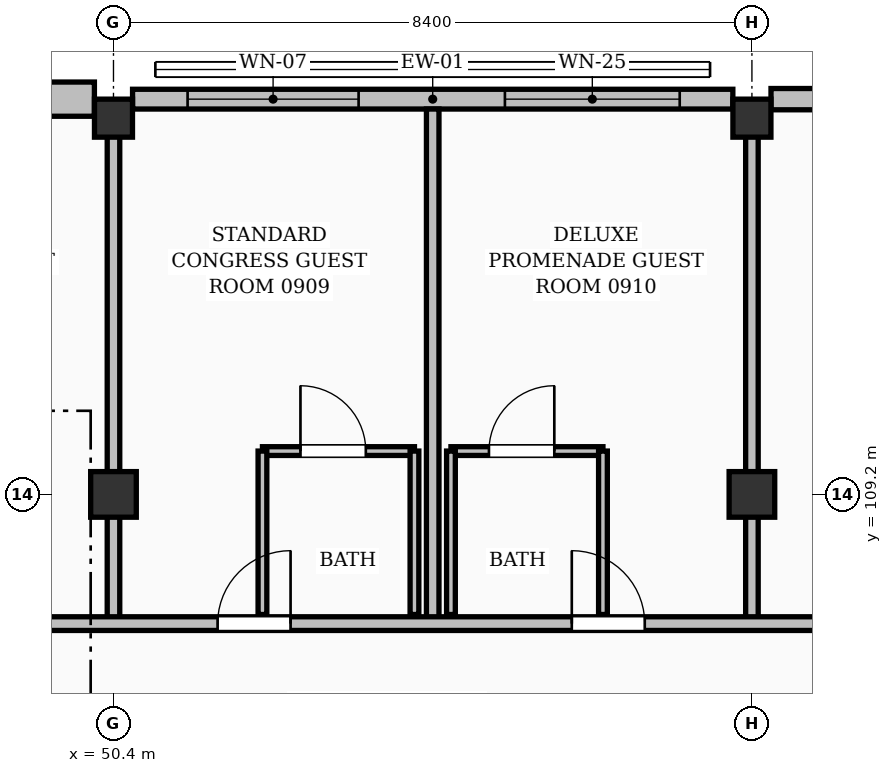
"""IFC4 building model, lengths in metres.
Left out: names, types, materials, properties, quantities, classifications, styles, units other than length and angle.
Written with IfcOpenShell. Run it as: python <this file> out.ifc"""

import sys

from ifc_helpers import new_model, si_unit, direction, frame, frame_2d, origin, origin_2d, place, context, subcontext, project, spatial, rectangle, extrude, element, fill, save


model = new_model("IFC4")
c1 = context("Model", 3, precision=1e-05, world=origin(), true_north=direction((0.0, 1.0)))
c2 = subcontext(c1, "Body", "Model", "MODEL_VIEW")
j1 = project(units=[si_unit("LENGTHUNIT", "METRE"), si_unit("PLANEANGLEUNIT", "RADIAN")], contexts=[c1])
p1 = place(None, origin())
s1 = spatial("IfcSite", under=j1, at=p1, CompositionType="ELEMENT")
p2 = place(p1, origin())
s2 = spatial("IfcBuilding", under=s1, at=p2, CompositionType="ELEMENT")
p3 = place(p2, frame((0.0, 0.0, 31.92)))
s3 = spatial("IfcBuildingStorey", under=s2, at=p3, CompositionType="ELEMENT", Elevation=31.92)
p4 = place(p3, frame((50.4, 109.2, 0.0), z_axis=(0.0, 0.0, 1.0), x_axis=(1.0, 0.0, 0.0)))
e1 = element("IfcColumn", 1, at=p4, inside=s3, PredefinedType="COLUMN", context=c2, shape_type="SweptSolid", body=[
    extrude(rectangle(XDim=0.6, YDim=0.6, at=origin_2d()), origin(), (0.0, 0.0, 1.0), 3.36),
])
p5 = place(p3, frame((50.4, 114.15, 0.0), z_axis=(0.0, 0.0, 1.0), x_axis=(1.0, 0.0, 0.0)))
e2 = element("IfcColumn", 2, at=p5, inside=s3, PredefinedType="COLUMN", context=c2, shape_type="SweptSolid", body=[
    extrude(rectangle(XDim=0.5, YDim=0.5, at=origin_2d()), origin(), (0.0, 0.0, 1.0), 3.36),
])
p6 = place(p3, frame((58.8, 109.2, 0.0), z_axis=(0.0, 0.0, 1.0), x_axis=(1.0, 0.0, 0.0)))
e3 = element("IfcColumn", 3, at=p6, inside=s3, PredefinedType="COLUMN", context=c2, shape_type="SweptSolid", body=[
    extrude(rectangle(XDim=0.6, YDim=0.6, at=origin_2d()), origin(), (0.0, 0.0, 1.0), 3.36),
])
p7 = place(p3, frame((58.8, 114.15, 0.0), z_axis=(0.0, 0.0, 1.0), x_axis=(1.0, 0.0, 0.0)))
e4 = element("IfcColumn", 4, at=p7, inside=s3, PredefinedType="COLUMN", context=c2, shape_type="SweptSolid", body=[
    extrude(rectangle(XDim=0.5, YDim=0.5, at=origin_2d()), origin(), (0.0, 0.0, 1.0), 3.36),
])
p8 = place(p3, frame((42.251, 114.4, 0.0), z_axis=(0.0, 0.0, 1.0), x_axis=(1.0, 0.0, 0.0)))
e5 = element("IfcWall", 5, at=p8, inside=s3, PredefinedType="SOLIDWALL", context=c2, shape_type="SweptSolid", body=[
    extrude(rectangle(XDim=7.898, YDim=0.45, at=frame_2d((3.949, 0.0))), origin(), (0.0, 0.0, 1.0), 2.474),
])
p9 = place(p8, frame((1.124, 0.0, 0.0)))
e6 = element("IfcOpeningElement", 6, at=p9, cuts=e5, PredefinedType="OPENING", context=c2, shape_type="SweptSolid", body=[
    extrude(rectangle(XDim=1.55, YDim=2.08, at=frame_2d((0.775, 1.04))), frame((0.0, 0.235, 0.0), z_axis=(0.0, -1.0, 0.0), x_axis=(1.0, 0.0, 0.0)), (0.0, 0.0, 1.0), 0.47),
])
p10 = place(p8, frame((4.724, 0.0, 0.25)))
e7 = element("IfcOpeningElement", 7, at=p10, cuts=e5, PredefinedType="OPENING", context=c2, shape_type="SweptSolid", body=[
    extrude(rectangle(XDim=2.35, YDim=1.85, at=frame_2d((1.175, 0.925))), frame((0.0, 0.235, 0.0), z_axis=(0.0, -1.0, 0.0), x_axis=(1.0, 0.0, 0.0)), (0.0, 0.0, 1.0), 0.47),
])
p11 = place(p3, frame((50.651, 114.4, 0.0), z_axis=(0.0, 0.0, 1.0), x_axis=(1.0, 0.0, 0.0)))
e8 = element("IfcWall", 8, at=p11, inside=s3, PredefinedType="SOLIDWALL", context=c2, shape_type="SweptSolid", body=[
    extrude(rectangle(XDim=7.898, YDim=0.26, at=frame_2d((3.949, 0.0))), origin(), (0.0, 0.0, 1.0), 2.414),
])
p12 = place(p11, frame((0.724, 0.0, 0.25)))
e9 = element("IfcOpeningElement", 9, at=p12, cuts=e8, PredefinedType="OPENING", context=c2, shape_type="SweptSolid", body=[
    extrude(rectangle(XDim=2.25, YDim=1.95, at=frame_2d((1.125, 0.975))), frame((0.0, 0.14, 0.0), z_axis=(0.0, -1.0, 0.0), x_axis=(1.0, 0.0, 0.0)), (0.0, 0.0, 1.0), 0.28),
])
p13 = place(p11, frame((4.899, 0.0, 0.25)))
e10 = element("IfcOpeningElement", 10, at=p13, cuts=e8, PredefinedType="OPENING", context=c2, shape_type="SweptSolid", body=[
    extrude(rectangle(XDim=2.3, YDim=1.75, at=frame_2d((1.15, 0.875))), frame((0.0, 0.14, 0.0), z_axis=(0.0, -1.0, 0.0), x_axis=(1.0, 0.0, 0.0)), (0.0, 0.0, 1.0), 0.28),
])
p14 = place(p3, frame((59.051, 114.4, 0.0), z_axis=(0.0, 0.0, 1.0), x_axis=(1.0, 0.0, 0.0)))
e11 = element("IfcWall", 11, at=p14, inside=s3, PredefinedType="SOLIDWALL", context=c2, shape_type="SweptSolid", body=[
    extrude(rectangle(XDim=7.898, YDim=0.28, at=frame_2d((3.949, 0.0))), origin(), (0.0, 0.0, 1.0), 2.414),
])
p15 = place(p14, frame((1.074, 0.0, 0.0)))
e12 = element("IfcOpeningElement", 12, at=p15, cuts=e11, PredefinedType="OPENING", context=c2, shape_type="SweptSolid", body=[
    extrude(rectangle(XDim=1.65, YDim=2.08, at=frame_2d((0.825, 1.04))), frame((0.0, 0.15, 0.0), z_axis=(0.0, -1.0, 0.0), x_axis=(1.0, 0.0, 0.0)), (0.0, 0.0, 1.0), 0.3),
])
p16 = place(p14, frame((4.749, 0.0, 0.25)))
e13 = element("IfcOpeningElement", 13, at=p16, cuts=e11, PredefinedType="OPENING", context=c2, shape_type="SweptSolid", body=[
    extrude(rectangle(XDim=2.3, YDim=1.75, at=frame_2d((1.15, 0.875))), frame((0.0, 0.15, 0.0), z_axis=(0.0, -1.0, 0.0), x_axis=(1.0, 0.0, 0.0)), (0.0, 0.0, 1.0), 0.3),
])
p17 = place(p3, frame((52.36, 109.77, 0.0), z_axis=(0.0, 0.0, 1.0), x_axis=(1.0, 0.0, 0.0)))
e14 = element("IfcWall", 14, at=p17, inside=s3, PredefinedType="PARTITIONING", context=c2, shape_type="SweptSolid", body=[
    extrude(rectangle(XDim=2.0, YDim=0.115, at=frame_2d((1.0, 0.0))), origin(), (0.0, 0.0, 1.0), 3.1),
])
p18 = place(p17, frame((0.5, 0.0, 0.0)))
e15 = element("IfcOpeningElement", 15, at=p18, cuts=e14, PredefinedType="OPENING", context=c2, shape_type="SweptSolid", body=[
    extrude(rectangle(XDim=0.86, YDim=2.05, at=frame_2d((0.43, 1.025))), frame((0.0, 0.067, 0.0), z_axis=(0.0, -1.0, 0.0), x_axis=(1.0, 0.0, 0.0)), (0.0, 0.0, 1.0), 0.135),
])
for number, where, z_axis, x_axis in (
    (16, (52.36, 107.62, 0.0), (0.0, 0.0, 1.0), (0.0, 1.0, 0.0)),
    (17, (54.36, 107.62, 0.0), (0.0, 0.0, 1.0), (0.0, 1.0, 0.0)),
):
    element("IfcWall", number, at=place(p3, frame(where, z_axis=z_axis, x_axis=x_axis)), inside=s3, PredefinedType="PARTITIONING", context=c2, shape_type="SweptSolid", body=[
        extrude(rectangle(XDim=2.15, YDim=0.115, at=frame_2d((1.075, 0.0))), origin(), (0.0, 0.0, 1.0), 3.1),
    ])
p19 = place(p3, frame((54.84, 109.77, 0.0), z_axis=(0.0, 0.0, 1.0), x_axis=(1.0, 0.0, 0.0)))
e18 = element("IfcWall", 18, at=p19, inside=s3, PredefinedType="PARTITIONING", context=c2, shape_type="SweptSolid", body=[
    extrude(rectangle(XDim=2.0, YDim=0.115, at=frame_2d((1.0, 0.0))), origin(), (0.0, 0.0, 1.0), 3.1),
])
p20 = place(p19, frame((0.5, 0.0, 0.0)))
e19 = element("IfcOpeningElement", 19, at=p20, cuts=e18, PredefinedType="OPENING", context=c2, shape_type="SweptSolid", body=[
    extrude(rectangle(XDim=0.86, YDim=2.05, at=frame_2d((0.43, 1.025))), frame((0.0, 0.067, 0.0), z_axis=(0.0, -1.0, 0.0), x_axis=(1.0, 0.0, 0.0)), (0.0, 0.0, 1.0), 0.135),
])
for number, where, z_axis, x_axis in (
    (20, (54.84, 107.62, 0.0), (0.0, 0.0, 1.0), (0.0, 1.0, 0.0)),
    (21, (56.84, 107.62, 0.0), (0.0, 0.0, 1.0), (0.0, 1.0, 0.0)),
):
    element("IfcWall", number, at=place(p3, frame(where, z_axis=z_axis, x_axis=x_axis)), inside=s3, PredefinedType="PARTITIONING", context=c2, shape_type="SweptSolid", body=[
        extrude(rectangle(XDim=2.15, YDim=0.115, at=frame_2d((1.075, 0.0))), origin(), (0.0, 0.0, 1.0), 3.1),
    ])
p21 = place(p3, frame((54.6, 107.5, 0.0), z_axis=(0.0, 0.0, 1.0), x_axis=(0.0, 1.0, 0.0)))
e22 = element("IfcWall", 22, at=p21, inside=s3, PredefinedType="PARTITIONING", context=c2, shape_type="SweptSolid", body=[
    extrude(rectangle(XDim=6.77, YDim=0.165, at=frame_2d((3.385, 0.0))), origin(), (0.0, 0.0, 1.0), 3.1),
])
p22 = place(p3, frame((50.4, 107.5, 0.0), z_axis=(0.0, 0.0, 1.0), x_axis=(0.0, 1.0, 0.0)))
e23 = element("IfcWall", 23, at=p22, inside=s3, PredefinedType="PARTITIONING", context=c2, shape_type="SweptSolid", body=[
    extrude(rectangle(XDim=6.55, YDim=0.165, at=frame_2d((3.275, 0.0))), origin(), (0.0, 0.0, 1.0), 2.33),
])
p23 = place(p3, frame((58.8, 107.5, 0.0), z_axis=(0.0, 0.0, 1.0), x_axis=(0.0, 1.0, 0.0)))
e24 = element("IfcWall", 24, at=p23, inside=s3, PredefinedType="PARTITIONING", context=c2, shape_type="SweptSolid", body=[
    extrude(rectangle(XDim=6.55, YDim=0.165, at=frame_2d((3.275, 0.0))), origin(), (0.0, 0.0, 1.0), 2.375),
])
p24 = place(p3, frame((40.66, 107.5, 0.0), z_axis=(0.0, 0.0, 1.0), x_axis=(1.0, 0.0, 0.0)))
e25 = element("IfcWall", 25, at=p24, inside=s3, PredefinedType="PARTITIONING", context=c2, shape_type="SweptSolid", body=[
    extrude(rectangle(XDim=26.365, YDim=0.18, at=frame_2d((13.183, 0.0))), origin(), (0.0, 0.0, 1.0), 3.1),
])
p25 = place(p24, frame((0.2, 0.0, 0.0)))
e26 = element("IfcOpeningElement", 26, at=p25, cuts=e25, PredefinedType="OPENING", context=c2, shape_type="SweptSolid", body=[
    extrude(rectangle(XDim=0.94, YDim=2.1, at=frame_2d((0.47, 1.05))), frame((0.0, 0.1, 0.0), z_axis=(0.0, -1.0, 0.0), x_axis=(1.0, 0.0, 0.0)), (0.0, 0.0, 1.0), 0.2),
])
p26 = place(p24, frame((2.71, 0.0, 0.0)))
e27 = element("IfcOpeningElement", 27, at=p26, cuts=e25, PredefinedType="OPENING", context=c2, shape_type="SweptSolid", body=[
    extrude(rectangle(XDim=0.96, YDim=2.15, at=frame_2d((0.48, 1.075))), frame((0.0, 0.1, 0.0), z_axis=(0.0, -1.0, 0.0), x_axis=(1.0, 0.0, 0.0)), (0.0, 0.0, 1.0), 0.2),
])
p27 = place(p24, frame((7.37, 0.0, 0.0)))
e28 = element("IfcOpeningElement", 28, at=p27, cuts=e25, PredefinedType="OPENING", context=c2, shape_type="SweptSolid", body=[
    extrude(rectangle(XDim=0.96, YDim=2.15, at=frame_2d((0.48, 1.075))), frame((0.0, 0.1, 0.0), z_axis=(0.0, -1.0, 0.0), x_axis=(1.0, 0.0, 0.0)), (0.0, 0.0, 1.0), 0.2),
])
p28 = place(p24, frame((11.11, 0.0, 0.0)))
e29 = element("IfcOpeningElement", 29, at=p28, cuts=e25, PredefinedType="OPENING", context=c2, shape_type="SweptSolid", body=[
    extrude(rectangle(XDim=0.96, YDim=2.15, at=frame_2d((0.48, 1.075))), frame((0.0, 0.1, 0.0), z_axis=(0.0, -1.0, 0.0), x_axis=(1.0, 0.0, 0.0)), (0.0, 0.0, 1.0), 0.2),
])
p29 = place(p24, frame((15.77, 0.0, 0.0)))
e30 = element("IfcOpeningElement", 30, at=p29, cuts=e25, PredefinedType="OPENING", context=c2, shape_type="SweptSolid", body=[
    extrude(rectangle(XDim=0.96, YDim=2.15, at=frame_2d((0.48, 1.075))), frame((0.0, 0.1, 0.0), z_axis=(0.0, -1.0, 0.0), x_axis=(1.0, 0.0, 0.0)), (0.0, 0.0, 1.0), 0.2),
])
p30 = place(p24, frame((19.64, 0.0, 0.0)))
e31 = element("IfcOpeningElement", 31, at=p30, cuts=e25, PredefinedType="OPENING", context=c2, shape_type="SweptSolid", body=[
    extrude(rectangle(XDim=1.02, YDim=2.15, at=frame_2d((0.51, 1.075))), frame((0.0, 0.1, 0.0), z_axis=(0.0, -1.0, 0.0), x_axis=(1.0, 0.0, 0.0)), (0.0, 0.0, 1.0), 0.2),
])
p31 = place(p12, origin())
e32 = element("IfcWindow", 32, at=p31, inside=s3, PartitioningType="DOUBLE_PANEL_VERTICAL", PredefinedType="WINDOW", context=c2, shape_type="SweptSolid", body=[
    extrude(rectangle(XDim=2.25, YDim=1.95, at=frame_2d((1.125, 0.975))), frame((0.0, 0.03, 0.0), z_axis=(0.0, -1.0, 0.0), x_axis=(1.0, 0.0, 0.0)), (0.0, 0.0, 1.0), 0.06),
])
fill(e9, e32)
p32 = place(p13, origin())
e33 = element("IfcWindow", 33, at=p32, inside=s3, PartitioningType="DOUBLE_PANEL_VERTICAL", PredefinedType="WINDOW", context=c2, shape_type="SweptSolid", body=[
    extrude(rectangle(XDim=2.3, YDim=1.75, at=frame_2d((1.15, 0.875))), frame((0.0, 0.03, 0.0), z_axis=(0.0, -1.0, 0.0), x_axis=(1.0, 0.0, 0.0)), (0.0, 0.0, 1.0), 0.06),
])
fill(e10, e33)
p33 = place(p18, origin())
e34 = element("IfcDoor", 34, at=p33, inside=s3, OperationType="SINGLE_SWING_LEFT", PredefinedType="DOOR", context=c2, shape_type="SweptSolid", body=[
    extrude(rectangle(XDim=0.86, YDim=2.05, at=frame_2d((0.43, 1.025))), frame((0.0, 0.025, 0.0), z_axis=(0.0, -1.0, 0.0), x_axis=(1.0, 0.0, 0.0)), (0.0, 0.0, 1.0), 0.05),
])
fill(e15, e34)
p34 = place(p20, origin())
e35 = element("IfcDoor", 35, at=p34, inside=s3, OperationType="SINGLE_SWING_RIGHT", PredefinedType="DOOR", context=c2, shape_type="SweptSolid", body=[
    extrude(rectangle(XDim=0.86, YDim=2.05, at=frame_2d((0.43, 1.025))), frame((0.0, 0.025, 0.0), z_axis=(0.0, -1.0, 0.0), x_axis=(1.0, 0.0, 0.0)), (0.0, 0.0, 1.0), 0.05),
])
fill(e19, e35)
p35 = place(p28, origin())
e36 = element("IfcDoor", 36, at=p35, inside=s3, OperationType="SINGLE_SWING_RIGHT", PredefinedType="DOOR", context=c2, shape_type="SweptSolid", body=[
    extrude(rectangle(XDim=0.96, YDim=2.15, at=frame_2d((0.48, 1.075))), frame((0.0, 0.025, 0.0), z_axis=(0.0, -1.0, 0.0), x_axis=(1.0, 0.0, 0.0)), (0.0, 0.0, 1.0), 0.05),
])
fill(e29, e36)
p36 = place(p29, origin())
e37 = element("IfcDoor", 37, at=p36, inside=s3, OperationType="SINGLE_SWING_LEFT", PredefinedType="DOOR", context=c2, shape_type="SweptSolid", body=[
    extrude(rectangle(XDim=0.96, YDim=2.15, at=frame_2d((0.48, 1.075))), frame((0.0, 0.025, 0.0), z_axis=(0.0, -1.0, 0.0), x_axis=(1.0, 0.0, 0.0)), (0.0, 0.0, 1.0), 0.05),
])
fill(e30, e37)
save(model, sys.argv[1])
